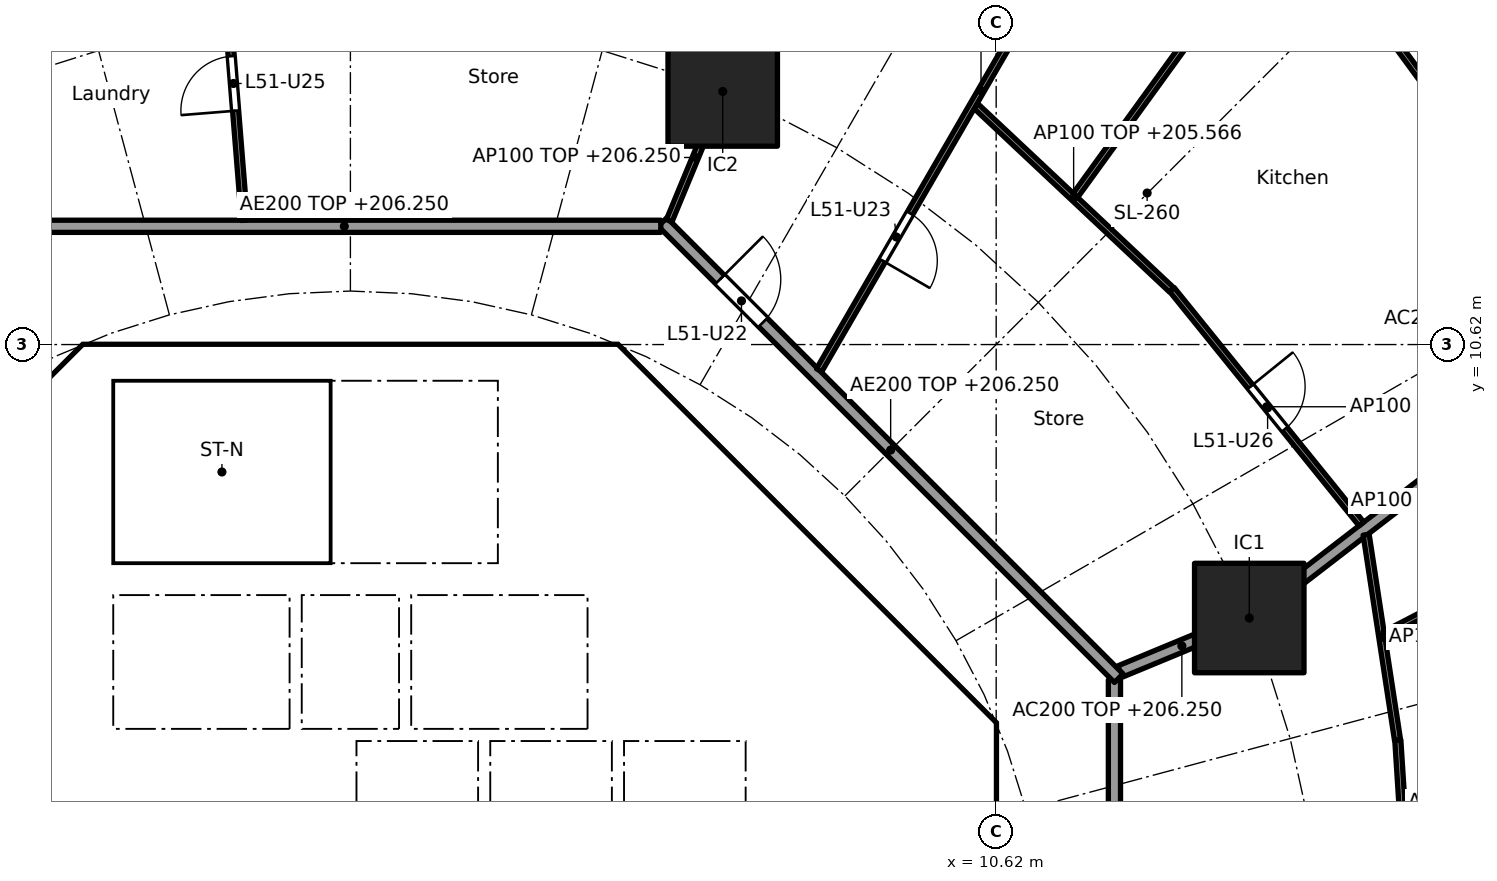
"""IFC4 building model, lengths in metres.
Left out: names, types, materials, properties, quantities, classifications, styles, units other than length and angle.
Written with IfcOpenShell. Run it as: python <this file> out.ifc"""

import sys

from ifc_helpers import new_model, si_unit, direction, frame, frame_2d, origin, origin_2d, place, context, subcontext, project, spatial, polyline, rectangle, outline, extrude, element, fill, save


model = new_model("IFC4")
c1 = context("Model", 3, precision=1e-05, world=origin(), true_north=direction((0.0, 1.0)))
c2 = subcontext(c1, "Body", "Model", "MODEL_VIEW")
j1 = project(units=[si_unit("LENGTHUNIT", "METRE"), si_unit("PLANEANGLEUNIT", "RADIAN")], contexts=[c1])
p1 = place(None, origin())
s1 = spatial("IfcSite", under=j1, at=p1, CompositionType="ELEMENT")
p2 = place(p1, origin())
s2 = spatial("IfcBuilding", under=s1, at=p2, CompositionType="ELEMENT")
p3 = place(p2, frame((0.0, 0.0, 202.9)))
s3 = spatial("IfcBuildingStorey", under=s2, at=p3, CompositionType="ELEMENT", Elevation=202.9)
for number, where, z_axis, x_axis in (
    (1, (14.782, 6.123, 0.0), (0.0, 0.0, 1.0), (1.0, 0.0, 0.0)),
    (2, (6.123, 14.782, 0.0), (0.0, 0.0, 1.0), (1.0, 0.0, 0.0)),
):
    element("IfcColumn", number, at=place(p3, frame(where, z_axis=z_axis, x_axis=x_axis)), inside=s3, PredefinedType="COLUMN", context=c2, shape_type="SweptSolid", body=[
        extrude(rectangle(XDim=1.8, YDim=1.8, at=origin_2d()), origin(), (0.0, 0.0, 1.0), 3.7),
    ])
p4 = place(p3, frame((9.988, 4.613, 0.0), z_axis=(0.0, 0.0, 1.0), x_axis=(-0.707106781187, 0.707106781187, 0.0)))
e3 = element("IfcWall", 3, at=p4, inside=s3, PredefinedType="SHEAR", context=c2, shape_type="SweptSolid", body=[
    extrude(rectangle(XDim=7.602, YDim=0.6, at=frame_2d((3.801, 0.0))), origin(), (0.0, 0.0, 1.0), 3.35),
])
p5 = place(p4, frame((3.201, 0.0, 0.0)))
e4 = element("IfcOpeningElement", 4, at=p5, cuts=e3, PredefinedType="OPENING", context=c2, shape_type="SweptSolid", body=[
    extrude(rectangle(XDim=1.2, YDim=2.1, at=frame_2d((0.6, 1.05))), frame((0.0, 0.31, 0.0), z_axis=(0.0, -1.0, 0.0), x_axis=(1.0, 0.0, 0.0)), (0.0, 0.0, 1.0), 0.62),
])
p6 = place(p3, frame((-4.613, 9.988, 0.0), z_axis=(0.0, 0.0, 1.0), x_axis=(-0.707106781187, -0.707106781187, 0.0)))
e5 = element("IfcWall", 5, at=p6, inside=s3, PredefinedType="SHEAR", context=c2, shape_type="SweptSolid", body=[
    extrude(rectangle(XDim=7.602, YDim=0.6, at=frame_2d((3.801, 0.0))), origin(), (0.0, 0.0, 1.0), 3.35),
])
p7 = place(p6, frame((0.351, 0.0, 0.0)))
e6 = element("IfcOpeningElement", 6, at=p7, cuts=e5, PredefinedType="OPENING", context=c2, shape_type="SweptSolid", body=[
    extrude(rectangle(XDim=1.1, YDim=2.1, at=frame_2d((0.55, 1.05))), frame((0.0, 0.31, 0.0), z_axis=(0.0, -1.0, 0.0), x_axis=(1.0, 0.0, 0.0)), (0.0, 0.0, 1.0), 0.62),
])
p8 = place(p3, frame((4.0, 4.3, 0.0), z_axis=(0.0, 0.0, 1.0), x_axis=(0.0, 1.0, 0.0)))
e7 = element("IfcWall", 7, at=p8, inside=s3, PredefinedType="SOLIDWALL", context=c2, shape_type="SweptSolid", body=[
    extrude(rectangle(XDim=2.2, YDim=0.2, at=frame_2d((1.1, 0.0))), origin(), (0.0, 0.0, 1.0), 3.35),
])
p9 = place(p8, frame((0.55, 0.0, 0.0)))
e8 = element("IfcOpeningElement", 8, at=p9, cuts=e7, PredefinedType="OPENING", context=c2, shape_type="SweptSolid", body=[
    extrude(rectangle(XDim=1.1, YDim=2.1, at=frame_2d((0.55, 1.05))), frame((0.0, 0.11, 0.0), z_axis=(0.0, -1.0, 0.0), x_axis=(1.0, 0.0, 0.0)), (0.0, 0.0, 1.0), 0.22),
])
p10 = place(p3, frame((-4.0, 4.3, 0.0), z_axis=(0.0, 0.0, 1.0), x_axis=(0.0, 1.0, 0.0)))
e9 = element("IfcWall", 9, at=p10, inside=s3, PredefinedType="SOLIDWALL", context=c2, shape_type="SweptSolid", body=[
    extrude(rectangle(XDim=2.2, YDim=0.2, at=frame_2d((1.1, 0.0))), origin(), (0.0, 0.0, 1.0), 3.35),
])
p11 = place(p10, frame((0.55, 0.0, 0.0)))
e10 = element("IfcOpeningElement", 10, at=p11, cuts=e9, PredefinedType="OPENING", context=c2, shape_type="SweptSolid", body=[
    extrude(rectangle(XDim=1.1, YDim=2.1, at=frame_2d((0.55, 1.05))), frame((0.0, 0.11, 0.0), z_axis=(0.0, -1.0, 0.0), x_axis=(1.0, 0.0, 0.0)), (0.0, 0.0, 1.0), 0.22),
])
p12 = place(p3, frame((6.7, 4.0, 0.0), z_axis=(0.0, 0.0, 1.0), x_axis=(1.0, 0.0, 0.0)))
e11 = element("IfcWall", 11, at=p12, inside=s3, PredefinedType="SOLIDWALL", context=c2, shape_type="SweptSolid", body=[
    extrude(rectangle(XDim=3.325, YDim=0.2, at=frame_2d((1.662, 0.0))), origin(), (0.0, 0.0, 1.0), 3.35),
])
p13 = place(p12, frame((1.25, 0.0, 0.0)))
e12 = element("IfcOpeningElement", 12, at=p13, cuts=e11, PredefinedType="OPENING", context=c2, shape_type="SweptSolid", body=[
    extrude(rectangle(XDim=1.1, YDim=2.1, at=frame_2d((0.55, 1.05))), frame((0.0, 0.11, 0.0), z_axis=(0.0, -1.0, 0.0), x_axis=(1.0, 0.0, 0.0)), (0.0, 0.0, 1.0), 0.22),
])
p14 = place(p3, frame((4.0, 7.025, 0.0), z_axis=(0.0, 0.0, 1.0), x_axis=(0.0, 1.0, 0.0)))
e13 = element("IfcWall", 13, at=p14, inside=s3, PredefinedType="SOLIDWALL", context=c2, shape_type="SweptSolid", body=[
    extrude(rectangle(XDim=3.0, YDim=0.2, at=frame_2d((1.5, 0.0))), origin(), (0.0, 0.0, 1.0), 3.35),
])
p15 = place(p14, frame((0.925, 0.0, 0.0)))
e14 = element("IfcOpeningElement", 14, at=p15, cuts=e13, PredefinedType="OPENING", context=c2, shape_type="SweptSolid", body=[
    extrude(rectangle(XDim=1.1, YDim=2.1, at=frame_2d((0.55, 1.05))), frame((0.0, 0.11, 0.0), z_axis=(0.0, -1.0, 0.0), x_axis=(1.0, 0.0, 0.0)), (0.0, 0.0, 1.0), 0.22),
])
p16 = place(p3, origin())
e15 = element("IfcWall", 15, at=p16, inside=s3, PredefinedType="SHEAR", context=c2, shape_type="SweptSolid", body=[
    extrude(outline(polyline([(-4.152, 10.025), (-4.401, 9.776), (-4.825, 10.2), (-4.401, 10.625), (4.401, 10.625), (4.825, 10.2), (4.401, 9.776), (4.152, 10.025), (-4.152, 10.025)])), origin(), (0.0, 0.0, 1.0), 3.35),
])
p17 = place(p3, origin())
e16 = element("IfcWall", 16, at=p17, inside=s3, PredefinedType="SHEAR", context=c2, shape_type="SweptSolid", body=[
    extrude(outline(polyline([(9.776, -4.401), (10.025, -4.152), (10.025, -3.801), (10.025, 4.152), (9.776, 4.401), (10.2, 4.825), (10.625, 4.401), (10.625, -4.401), (10.2, -4.825), (9.776, -4.401)])), origin(), (0.0, 0.0, 1.0), 3.35),
])
for number, where, z_axis, x_axis in (
    (17, (-0.9, 4.3, 0.0), (0.0, 0.0, 1.0), (0.0, 1.0, 0.0)),
    (18, (0.9, 4.3, 0.0), (0.0, 0.0, 1.0), (0.0, 1.0, 0.0)),
):
    element("IfcWall", number, at=place(p3, frame(where, z_axis=z_axis, x_axis=x_axis)), inside=s3, PredefinedType="SOLIDWALL", context=c2, shape_type="SweptSolid", body=[
        extrude(rectangle(XDim=2.2, YDim=0.2, at=frame_2d((1.1, 0.0))), origin(), (0.0, 0.0, 1.0), 3.35),
    ])
p18 = place(p3, origin())
e19 = element("IfcWall", 19, at=p18, inside=s3, PredefinedType="SOLIDWALL", context=c2, shape_type="SweptSolid", body=[
    extrude(outline(polyline([(-6.7, 4.3), (6.7, 4.3), (6.7, 2.1), (6.5, 2.1), (6.5, 4.1), (4.5, 4.1), (4.5, 2.1), (4.3, 2.1), (4.3, 4.1), (2.3, 4.1), (2.3, 2.1), (2.1, 2.1), (2.1, 4.1), (0.1, 4.1), (0.1, 2.1), (-0.1, 2.1), (-0.1, 4.1), (-6.5, 4.1), (-6.5, 2.1), (-6.7, 2.1), (-6.7, 4.3)])), origin(), (0.0, 0.0, 1.0), 3.35),
])
p19 = place(p3, origin())
e20 = element("IfcWall", 20, at=p19, inside=s3, PredefinedType="SOLIDWALL", context=c2, shape_type="SweptSolid", body=[
    extrude(outline(polyline([(-3.9, 7.025), (-4.1, 7.025), (-4.1, 10.025), (-3.9, 10.025), (-3.9, 7.025)])), origin(), (0.0, 0.0, 1.0), 3.35),
])
p20 = place(p3, origin())
e21 = element("IfcWall", 21, at=p20, inside=s3, PredefinedType="SOLIDWALL", context=c2, shape_type="SweptSolid", body=[
    extrude(outline(polyline([(4.1, 6.5), (-4.1, 6.5), (-4.1, 7.025), (4.1, 7.025), (4.1, 6.5)])), origin(), (0.0, 0.0, 1.0), 3.35),
])
p21 = place(p3, origin())
e22 = element("IfcWall", 22, at=p21, inside=s3, PredefinedType="SOLIDWALL", context=c2, shape_type="SweptSolid", body=[
    extrude(outline(polyline([(7.025, -3.9), (6.7, -3.9), (6.7, 3.9), (7.025, 3.9), (7.025, -3.9)])), origin(), (0.0, 0.0, 1.0), 3.35),
])
p22 = place(p3, frame((12.657, 5.243, 0.0), z_axis=(0.0, 0.0, 1.0), x_axis=(0.92383017907, 0.382802560388, 0.0)))
e23 = element("IfcWall", 23, at=p22, inside=s3, PredefinedType="PARTITIONING", context=c2, shape_type="SweptSolid", body=[
    extrude(rectangle(XDim=2.2, YDim=0.2, at=frame_2d((1.1, 0.0))), origin(), (0.0, 0.0, 1.0), 3.35),
])
p23 = place(p3, frame((14.822, 6.154, 0.0), z_axis=(0.0, 0.0, 1.0), x_axis=(0.792203056092, 0.610257583254, 0.0)))
e24 = element("IfcWall", 24, at=p23, inside=s3, PredefinedType="PARTITIONING", context=c2, shape_type="SweptSolid", body=[
    extrude(rectangle(XDim=12.533, YDim=0.2, at=frame_2d((6.266, 0.0))), origin(), (0.0, 0.0, 1.0), 2.666),
])
p24 = place(p3, frame((12.565, -5.104, 0.0), z_axis=(0.0, 0.0, 1.0), x_axis=(0.0, 1.0, 0.0)))
e25 = element("IfcWall", 25, at=p24, inside=s3, PredefinedType="PARTITIONING", context=c2, shape_type="SweptSolid", body=[
    extrude(rectangle(XDim=10.209, YDim=0.2, at=frame_2d((5.104, 0.0))), origin(), (0.0, 0.0, 1.0), 3.35),
])
p25 = place(p3, frame((12.635, 5.134, 0.0), z_axis=(0.0, 0.0, 1.0), x_axis=(-0.707106781187, 0.707106781187, 0.0)))
e26 = element("IfcWall", 26, at=p25, inside=s3, PredefinedType="PARTITIONING", context=c2, shape_type="SweptSolid", body=[
    extrude(rectangle(XDim=10.609, YDim=0.2, at=frame_2d((5.305, 0.0))), origin(), (0.0, 0.0, 1.0), 3.35),
])
p26 = place(p25, frame((8.274, 0.0, 0.0)))
e27 = element("IfcOpeningElement", 27, at=p26, cuts=e26, PredefinedType="OPENING", context=c2, shape_type="SweptSolid", body=[
    extrude(rectangle(XDim=1.0, YDim=2.1, at=frame_2d((0.5, 1.05))), frame((0.0, 0.11, 0.0), z_axis=(0.0, -1.0, 0.0), x_axis=(1.0, 0.0, 0.0)), (0.0, 0.0, 1.0), 0.22),
])
p27 = place(p3, frame((5.104, 12.565, 0.0), z_axis=(0.0, 0.0, 1.0), x_axis=(-1.0, 0.0, 0.0)))
e28 = element("IfcWall", 28, at=p27, inside=s3, PredefinedType="PARTITIONING", context=c2, shape_type="SweptSolid", body=[
    extrude(rectangle(XDim=10.409, YDim=0.2, at=frame_2d((5.205, 0.0))), origin(), (0.0, 0.0, 1.0), 3.35),
])
p28 = place(p3, frame((17.485, 0.05, 0.0), z_axis=(0.0, 0.0, 1.0), x_axis=(-0.063673473968, 0.997970785501, 0.0)))
e29 = element("IfcWall", 29, at=p28, inside=s3, PredefinedType="PARTITIONING", context=c2, shape_type="SweptSolid", body=[
    extrude(rectangle(XDim=4.072, YDim=0.1, at=frame_2d((2.036, 0.0))), origin(), (0.0, 0.0, 1.0), 2.666),
])
p29 = place(p28, frame((1.561, 0.0, 0.0)))
e30 = element("IfcOpeningElement", 30, at=p29, cuts=e29, PredefinedType="OPENING", context=c2, shape_type="SweptSolid", body=[
    extrude(rectangle(XDim=0.9, YDim=2.1, at=frame_2d((0.45, 1.05))), frame((0.0, 0.06, 0.0), z_axis=(0.0, -1.0, 0.0), x_axis=(1.0, 0.0, 0.0)), (0.0, 0.0, 1.0), 0.12),
])
p30 = place(p3, frame((17.221, 4.113, 0.0), z_axis=(0.0, 0.0, 1.0), x_axis=(-0.1510806336, 0.988521442434, 0.0)))
e31 = element("IfcWall", 31, at=p30, inside=s3, PredefinedType="PARTITIONING", context=c2, shape_type="SweptSolid", body=[
    extrude(rectangle(XDim=3.419, YDim=0.1, at=frame_2d((1.71, 0.0))), origin(), (0.0, 0.0, 1.0), 2.666),
])
p31 = place(p3, frame((17.003, 5.851, 0.0), z_axis=(0.0, 0.0, 1.0), x_axis=(0.887654549419, 0.460509935719, 0.0)))
e32 = element("IfcWall", 32, at=p31, inside=s3, PredefinedType="PARTITIONING", context=c2, shape_type="SweptSolid", body=[
    extrude(rectangle(XDim=4.99, YDim=0.1, at=frame_2d((2.495, 0.0))), origin(), (0.0, 0.0, 1.0), 3.35),
])
p32 = place(p3, frame((16.626, 7.67, 0.0), z_axis=(0.0, 0.0, 1.0), x_axis=(-0.628764602857, 0.777595700987, 0.0)))
e33 = element("IfcWall", 33, at=p32, inside=s3, PredefinedType="PARTITIONING", context=c2, shape_type="SweptSolid", body=[
    extrude(rectangle(XDim=4.957, YDim=0.1, at=frame_2d((2.479, 0.0))), origin(), (0.0, 0.0, 1.0), 2.666),
])
p33 = place(p32, frame((2.004, 0.0, 0.0)))
e34 = element("IfcOpeningElement", 34, at=p33, cuts=e33, PredefinedType="OPENING", context=c2, shape_type="SweptSolid", body=[
    extrude(rectangle(XDim=0.9, YDim=2.1, at=frame_2d((0.45, 1.05))), frame((0.0, 0.06, 0.0), z_axis=(0.0, -1.0, 0.0), x_axis=(1.0, 0.0, 0.0)), (0.0, 0.0, 1.0), 0.12),
])
p34 = place(p3, frame((20.692, 10.802, 0.0), z_axis=(0.0, 0.0, 1.0), x_axis=(-0.591122127251, 0.806582066918, 0.0)))
e35 = element("IfcWall", 35, at=p34, inside=s3, PredefinedType="PARTITIONING", context=c2, shape_type="SweptSolid", body=[
    extrude(rectangle(XDim=5.96, YDim=0.1, at=frame_2d((2.98, 0.0))), origin(), (0.0, 0.0, 1.0), 2.666),
])
p35 = place(p34, frame((2.505, 0.0, 0.0)))
e36 = element("IfcOpeningElement", 36, at=p35, cuts=e35, PredefinedType="OPENING", context=c2, shape_type="SweptSolid", body=[
    extrude(rectangle(XDim=0.9, YDim=2.1, at=frame_2d((0.45, 1.05))), frame((0.0, 0.06, 0.0), z_axis=(0.0, -1.0, 0.0), x_axis=(1.0, 0.0, 0.0)), (0.0, 0.0, 1.0), 0.12),
])
p36 = place(p3, frame((13.504, 11.52, 0.0), z_axis=(0.0, 0.0, 1.0), x_axis=(-0.728885663674, 0.684635442619, 0.0)))
e37 = element("IfcWall", 37, at=p36, inside=s3, PredefinedType="PARTITIONING", context=c2, shape_type="SweptSolid", body=[
    extrude(rectangle(XDim=4.419, YDim=0.1, at=frame_2d((2.21, 0.0))), origin(), (0.0, 0.0, 1.0), 2.666),
])
p37 = place(p3, frame((11.923, 13.073, 0.0), z_axis=(0.0, 0.0, 1.0), x_axis=(0.586643945506, 0.809844973561, 0.0)))
e38 = element("IfcWall", 38, at=p37, inside=s3, PredefinedType="PARTITIONING", context=c2, shape_type="SweptSolid", body=[
    extrude(rectangle(XDim=12.104, YDim=0.1, at=frame_2d((6.052, 0.0))), origin(), (0.0, 0.0, 1.0), 2.747),
])
p38 = place(p37, frame((8.31, 0.0, 0.0)))
e39 = element("IfcOpeningElement", 39, at=p38, cuts=e38, PredefinedType="OPENING", context=c2, shape_type="SweptSolid", body=[
    extrude(rectangle(XDim=0.9, YDim=2.1, at=frame_2d((0.45, 1.05))), frame((0.0, 0.06, 0.0), z_axis=(0.0, -1.0, 0.0), x_axis=(1.0, 0.0, 0.0)), (0.0, 0.0, 1.0), 0.12),
])
p39 = place(p3, frame((7.708, 10.198, 0.0), z_axis=(0.0, 0.0, 1.0), x_axis=(0.501288100085, 0.865280440501, 0.0)))
e40 = element("IfcWall", 40, at=p39, inside=s3, PredefinedType="PARTITIONING", context=c2, shape_type="SweptSolid", body=[
    extrude(rectangle(XDim=10.623, YDim=0.1, at=frame_2d((5.312, 0.0))), origin(), (0.0, 0.0, 1.0), 2.515),
])
p40 = place(p39, frame((2.082, 0.0, 0.0)))
e41 = element("IfcOpeningElement", 41, at=p40, cuts=e40, PredefinedType="OPENING", context=c2, shape_type="SweptSolid", body=[
    extrude(rectangle(XDim=0.9, YDim=2.1, at=frame_2d((0.45, 1.05))), frame((0.0, 0.06, 0.0), z_axis=(0.0, -1.0, 0.0), x_axis=(1.0, 0.0, 0.0)), (0.0, 0.0, 1.0), 0.12),
])
p41 = place(p39, frame((7.369, 0.0, 0.0)))
e42 = element("IfcOpeningElement", 42, at=p41, cuts=e40, PredefinedType="OPENING", context=c2, shape_type="SweptSolid", body=[
    extrude(rectangle(XDim=0.9, YDim=2.1, at=frame_2d((0.45, 1.05))), frame((0.0, 0.06, 0.0), z_axis=(0.0, -1.0, 0.0), x_axis=(1.0, 0.0, 0.0)), (0.0, 0.0, 1.0), 0.12),
])
p42 = place(p3, frame((5.243, 12.657, 0.0), z_axis=(0.0, 0.0, 1.0), x_axis=(0.382719158442, 0.923864733477, 0.0)))
e43 = element("IfcWall", 43, at=p42, inside=s3, PredefinedType="PARTITIONING", context=c2, shape_type="SweptSolid", body=[
    extrude(rectangle(XDim=2.25, YDim=0.1, at=frame_2d((1.125, 0.0))), origin(), (0.0, 0.0, 1.0), 3.35),
])
p43 = place(p3, frame((6.138, 14.83, 0.0), z_axis=(0.0, 0.0, 1.0), x_axis=(0.294818517221, 0.955553264818, 0.0)))
e44 = element("IfcWall", 44, at=p43, inside=s3, PredefinedType="PARTITIONING", context=c2, shape_type="SweptSolid", body=[
    extrude(rectangle(XDim=12.619, YDim=0.1, at=frame_2d((6.31, 0.0))), origin(), (0.0, 0.0, 1.0), 2.666),
])
p44 = place(p43, frame((1.306, 0.0, 0.0)))
e45 = element("IfcOpeningElement", 45, at=p44, cuts=e44, PredefinedType="OPENING", context=c2, shape_type="SweptSolid", body=[
    extrude(rectangle(XDim=0.9, YDim=2.1, at=frame_2d((0.45, 1.05))), frame((0.0, 0.06, 0.0), z_axis=(0.0, -1.0, 0.0), x_axis=(1.0, 0.0, 0.0)), (0.0, 0.0, 1.0), 0.12),
])
p45 = place(p43, frame((4.515, 0.0, 0.0)))
e46 = element("IfcOpeningElement", 46, at=p45, cuts=e44, PredefinedType="OPENING", context=c2, shape_type="SweptSolid", body=[
    extrude(rectangle(XDim=0.9, YDim=2.1, at=frame_2d((0.45, 1.05))), frame((0.0, 0.06, 0.0), z_axis=(0.0, -1.0, 0.0), x_axis=(1.0, 0.0, 0.0)), (0.0, 0.0, 1.0), 0.12),
])
p46 = place(p3, frame((-1.743, 12.665, 0.0), z_axis=(0.0, 0.0, 1.0), x_axis=(-0.080170892619, 0.996781133437, 0.0)))
e47 = element("IfcWall", 47, at=p46, inside=s3, PredefinedType="PARTITIONING", context=c2, shape_type="SweptSolid", body=[
    extrude(rectangle(XDim=9.483, YDim=0.1, at=frame_2d((4.741, 0.0))), origin(), (0.0, 0.0, 1.0), 2.515),
])
p47 = place(p46, frame((1.806, 0.0, 0.0)))
e48 = element("IfcOpeningElement", 48, at=p47, cuts=e47, PredefinedType="OPENING", context=c2, shape_type="SweptSolid", body=[
    extrude(rectangle(XDim=0.9, YDim=2.1, at=frame_2d((0.45, 1.05))), frame((0.0, 0.06, 0.0), z_axis=(0.0, -1.0, 0.0), x_axis=(1.0, 0.0, 0.0)), (0.0, 0.0, 1.0), 0.12),
])
p48 = place(p46, frame((6.523, 0.0, 0.0)))
e49 = element("IfcOpeningElement", 49, at=p48, cuts=e47, PredefinedType="OPENING", context=c2, shape_type="SweptSolid", body=[
    extrude(rectangle(XDim=0.9, YDim=2.1, at=frame_2d((0.45, 1.05))), frame((0.0, 0.06, 0.0), z_axis=(0.0, -1.0, 0.0), x_axis=(1.0, 0.0, 0.0)), (0.0, 0.0, 1.0), 0.12),
])
p49 = place(p9, origin())
e50 = element("IfcDoor", 50, at=p49, inside=s3, OperationType="DOUBLE_DOOR_SLIDING", PredefinedType="DOOR", context=c2, shape_type="SweptSolid", body=[
    extrude(rectangle(XDim=1.1, YDim=2.1, at=frame_2d((0.55, 1.05))), frame((0.0, 0.025, 0.0), z_axis=(0.0, -1.0, 0.0), x_axis=(1.0, 0.0, 0.0)), (0.0, 0.0, 1.0), 0.05),
])
fill(e8, e50)
p50 = place(p11, origin())
e51 = element("IfcDoor", 51, at=p50, inside=s3, OperationType="DOUBLE_DOOR_SLIDING", PredefinedType="DOOR", context=c2, shape_type="SweptSolid", body=[
    extrude(rectangle(XDim=1.1, YDim=2.1, at=frame_2d((0.55, 1.05))), frame((0.0, 0.025, 0.0), z_axis=(0.0, -1.0, 0.0), x_axis=(1.0, 0.0, 0.0)), (0.0, 0.0, 1.0), 0.05),
])
fill(e10, e51)
p51 = place(p13, frame((1.1, 0.0, 0.0), x_axis=(-1.0, 0.0, 0.0)))
e52 = element("IfcDoor", 52, at=p51, inside=s3, OperationType="SINGLE_SWING_RIGHT", PredefinedType="DOOR", context=c2, shape_type="SweptSolid", body=[
    extrude(rectangle(XDim=1.1, YDim=2.1, at=frame_2d((0.55, 1.05))), frame((0.0, 0.025, 0.0), z_axis=(0.0, -1.0, 0.0), x_axis=(1.0, 0.0, 0.0)), (0.0, 0.0, 1.0), 0.05),
])
fill(e12, e52)
p52 = place(p15, origin())
e53 = element("IfcDoor", 53, at=p52, inside=s3, OperationType="SINGLE_SWING_LEFT", PredefinedType="DOOR", context=c2, shape_type="SweptSolid", body=[
    extrude(rectangle(XDim=1.1, YDim=2.1, at=frame_2d((0.55, 1.05))), frame((0.0, 0.025, 0.0), z_axis=(0.0, -1.0, 0.0), x_axis=(1.0, 0.0, 0.0)), (0.0, 0.0, 1.0), 0.05),
])
fill(e14, e53)
p53 = place(p5, origin())
e54 = element("IfcDoor", 54, at=p53, inside=s3, OperationType="SINGLE_SWING_RIGHT", PredefinedType="DOOR", context=c2, shape_type="SweptSolid", body=[
    extrude(rectangle(XDim=1.2, YDim=2.1, at=frame_2d((0.6, 1.05))), frame((0.0, 0.025, 0.0), z_axis=(0.0, -1.0, 0.0), x_axis=(1.0, 0.0, 0.0)), (0.0, 0.0, 1.0), 0.05),
])
fill(e4, e54)
p54 = place(p7, origin())
e55 = element("IfcDoor", 55, at=p54, inside=s3, OperationType="SINGLE_SWING_RIGHT", PredefinedType="DOOR", context=c2, shape_type="SweptSolid", body=[
    extrude(rectangle(XDim=1.1, YDim=2.1, at=frame_2d((0.55, 1.05))), frame((0.0, 0.025, 0.0), z_axis=(0.0, -1.0, 0.0), x_axis=(1.0, 0.0, 0.0)), (0.0, 0.0, 1.0), 0.05),
])
fill(e6, e55)
p55 = place(p26, frame((1.0, 0.0, 0.0), x_axis=(-1.0, 0.0, 0.0)))
e56 = element("IfcDoor", 56, at=p55, inside=s3, OperationType="SINGLE_SWING_LEFT", PredefinedType="DOOR", context=c2, shape_type="SweptSolid", body=[
    extrude(rectangle(XDim=1.0, YDim=2.1, at=frame_2d((0.5, 1.05))), frame((0.0, 0.025, 0.0), z_axis=(0.0, -1.0, 0.0), x_axis=(1.0, 0.0, 0.0)), (0.0, 0.0, 1.0), 0.05),
])
fill(e27, e56)
p56 = place(p40, frame((0.9, 0.0, 0.0), x_axis=(-1.0, 0.0, 0.0)))
e57 = element("IfcDoor", 57, at=p56, inside=s3, OperationType="SINGLE_SWING_RIGHT", PredefinedType="DOOR", context=c2, shape_type="SweptSolid", body=[
    extrude(rectangle(XDim=0.9, YDim=2.1, at=frame_2d((0.45, 1.05))), frame((0.0, 0.025, 0.0), z_axis=(0.0, -1.0, 0.0), x_axis=(1.0, 0.0, 0.0)), (0.0, 0.0, 1.0), 0.05),
])
fill(e41, e57)
p57 = place(p47, origin())
e58 = element("IfcDoor", 58, at=p57, inside=s3, OperationType="SINGLE_SWING_LEFT", PredefinedType="DOOR", context=c2, shape_type="SweptSolid", body=[
    extrude(rectangle(XDim=0.9, YDim=2.1, at=frame_2d((0.45, 1.05))), frame((0.0, 0.025, 0.0), z_axis=(0.0, -1.0, 0.0), x_axis=(1.0, 0.0, 0.0)), (0.0, 0.0, 1.0), 0.05),
])
fill(e48, e58)
p58 = place(p33, frame((0.9, 0.0, 0.0), x_axis=(-1.0, 0.0, 0.0)))
e59 = element("IfcDoor", 59, at=p58, inside=s3, OperationType="SINGLE_SWING_LEFT", PredefinedType="DOOR", context=c2, shape_type="SweptSolid", body=[
    extrude(rectangle(XDim=0.9, YDim=2.1, at=frame_2d((0.45, 1.05))), frame((0.0, 0.025, 0.0), z_axis=(0.0, -1.0, 0.0), x_axis=(1.0, 0.0, 0.0)), (0.0, 0.0, 1.0), 0.05),
])
fill(e34, e59)
save(model, sys.argv[1])
